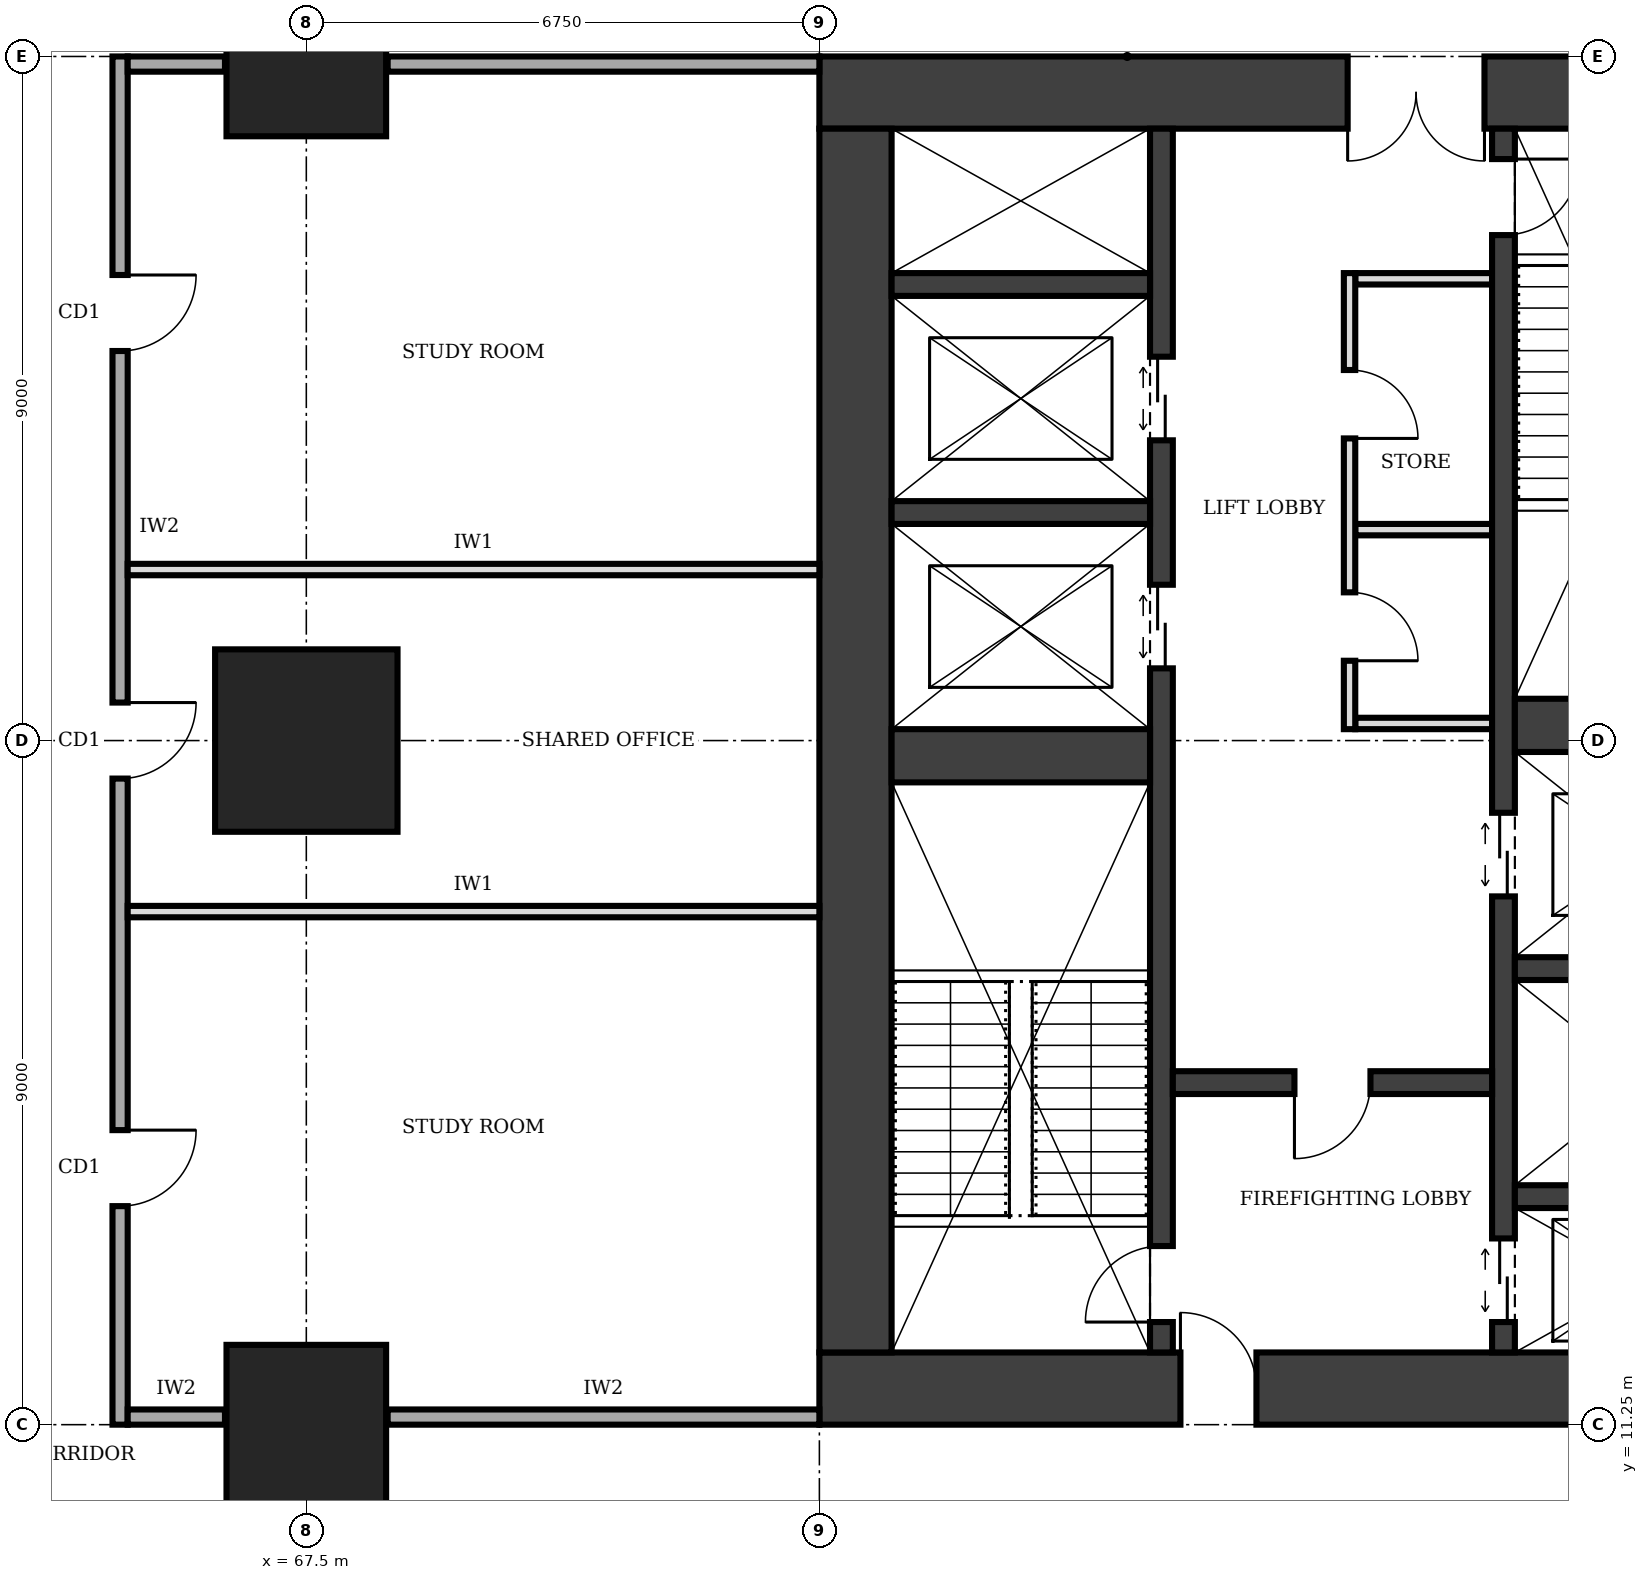
"""IFC4 building model, lengths in metres.
Left out: names, types, materials, properties, quantities, classifications, styles, units other than length and angle.
Written with IfcOpenShell. Run it as: python <this file> out.ifc"""

import sys

from ifc_helpers import new_model, si_unit, direction, frame, frame_2d, origin, origin_2d, place, context, subcontext, project, spatial, rectangle, extrude, element, fill, save


model = new_model("IFC4")
c1 = context("Model", 3, precision=1e-05, world=origin(), true_north=direction((0.0, 1.0)))
c2 = subcontext(c1, "Body", "Model", "MODEL_VIEW")
j1 = project(units=[si_unit("LENGTHUNIT", "METRE"), si_unit("PLANEANGLEUNIT", "RADIAN")], contexts=[c1])
p1 = place(None, origin())
s1 = spatial("IfcSite", under=j1, at=p1, CompositionType="ELEMENT")
p2 = place(p1, origin())
s2 = spatial("IfcBuilding", under=s1, at=p2, CompositionType="ELEMENT")
p3 = place(p2, frame((0.0, 0.0, 97.0)))
s3 = spatial("IfcBuildingStorey", under=s2, at=p3, CompositionType="ELEMENT", Elevation=97.0)
p4 = place(p3, frame((74.25, 11.725, 0.0), z_axis=(0.0, 0.0, 1.0), x_axis=(1.0, 0.0, 0.0)))
e1 = element("IfcWall", 1, at=p4, inside=s3, PredefinedType="SHEAR", context=c2, shape_type="SweptSolid", body=[
    extrude(rectangle(XDim=13.5, YDim=0.95, at=frame_2d((6.75, 0.0))), origin(), (0.0, 0.0, 1.0), 4.0),
])
p5 = place(p4, frame((4.75, 0.0, 0.0)))
e2 = element("IfcOpeningElement", 2, at=p5, cuts=e1, PredefinedType="OPENING", context=c2, shape_type="SweptSolid", body=[
    extrude(rectangle(XDim=1.0, YDim=2.1, at=frame_2d((0.5, 1.05))), frame((0.0, 0.485, 0.0), z_axis=(0.0, -1.0, 0.0), x_axis=(1.0, 0.0, 0.0)), (0.0, 0.0, 1.0), 0.97),
])
p6 = place(p3, frame((87.75, 28.775, 0.0), z_axis=(0.0, 0.0, 1.0), x_axis=(-1.0, 0.0, 0.0)))
e3 = element("IfcWall", 3, at=p6, inside=s3, PredefinedType="SHEAR", context=c2, shape_type="SweptSolid", body=[
    extrude(rectangle(XDim=13.5, YDim=0.95, at=frame_2d((6.75, 0.0))), origin(), (0.0, 0.0, 1.0), 4.0),
])
p7 = place(p6, frame((4.75, 0.0, 0.0)))
e4 = element("IfcOpeningElement", 4, at=p7, cuts=e3, PredefinedType="OPENING", context=c2, shape_type="SweptSolid", body=[
    extrude(rectangle(XDim=1.8, YDim=2.1, at=frame_2d((0.9, 1.05))), frame((0.0, 0.485, 0.0), z_axis=(0.0, -1.0, 0.0), x_axis=(1.0, 0.0, 0.0)), (0.0, 0.0, 1.0), 0.97),
])
p8 = place(p3, frame((74.725, 28.3, 0.0), z_axis=(0.0, 0.0, 1.0), x_axis=(0.0, -1.0, 0.0)))
e5 = element("IfcWall", 5, at=p8, inside=s3, PredefinedType="SHEAR", context=c2, shape_type="SweptSolid", body=[
    extrude(rectangle(XDim=16.1, YDim=0.95, at=frame_2d((8.05, 0.0))), origin(), (0.0, 0.0, 1.0), 4.0),
])
p9 = place(p3, frame((78.75, 12.2, 0.0), z_axis=(0.0, 0.0, 1.0), x_axis=(0.0, 1.0, 0.0)))
e6 = element("IfcWall", 6, at=p9, inside=s3, PredefinedType="SHEAR", context=c2, shape_type="SweptSolid", body=[
    extrude(rectangle(XDim=16.1, YDim=0.3, at=frame_2d((8.05, 0.0))), origin(), (0.0, 0.0, 1.0), 4.0),
])
p10 = place(p9, frame((0.4, 0.0, 0.0)))
e7 = element("IfcOpeningElement", 7, at=p10, cuts=e6, PredefinedType="OPENING", context=c2, shape_type="SweptSolid", body=[
    extrude(rectangle(XDim=1.0, YDim=2.1, at=frame_2d((0.5, 1.05))), frame((0.0, 0.16, 0.0), z_axis=(0.0, -1.0, 0.0), x_axis=(1.0, 0.0, 0.0)), (0.0, 0.0, 1.0), 0.32),
])
p11 = place(p9, frame((9.0, 0.0, 0.0)))
e8 = element("IfcOpeningElement", 8, at=p11, cuts=e6, PredefinedType="OPENING", context=c2, shape_type="SweptSolid", body=[
    extrude(rectangle(XDim=1.1, YDim=2.1, at=frame_2d((0.55, 1.05))), frame((0.0, 0.16, 0.0), z_axis=(0.0, -1.0, 0.0), x_axis=(1.0, 0.0, 0.0)), (0.0, 0.0, 1.0), 0.32),
])
p12 = place(p9, frame((12.0, 0.0, 0.0)))
e9 = element("IfcOpeningElement", 9, at=p12, cuts=e6, PredefinedType="OPENING", context=c2, shape_type="SweptSolid", body=[
    extrude(rectangle(XDim=1.1, YDim=2.1, at=frame_2d((0.55, 1.05))), frame((0.0, 0.16, 0.0), z_axis=(0.0, -1.0, 0.0), x_axis=(1.0, 0.0, 0.0)), (0.0, 0.0, 1.0), 0.32),
])
p13 = place(p3, frame((83.25, 12.2, 0.0), z_axis=(0.0, 0.0, 1.0), x_axis=(0.0, 1.0, 0.0)))
e10 = element("IfcWall", 10, at=p13, inside=s3, PredefinedType="SHEAR", context=c2, shape_type="SweptSolid", body=[
    extrude(rectangle(XDim=16.1, YDim=0.3, at=frame_2d((8.05, 0.0))), origin(), (0.0, 0.0, 1.0), 4.0),
])
p14 = place(p13, frame((14.7, 0.0, 0.0)))
e11 = element("IfcOpeningElement", 11, at=p14, cuts=e10, PredefinedType="OPENING", context=c2, shape_type="SweptSolid", body=[
    extrude(rectangle(XDim=1.0, YDim=2.1, at=frame_2d((0.5, 1.05))), frame((0.0, 0.16, 0.0), z_axis=(0.0, -1.0, 0.0), x_axis=(1.0, 0.0, 0.0)), (0.0, 0.0, 1.0), 0.32),
])
p15 = place(p13, frame((0.4, 0.0, 0.0)))
e12 = element("IfcOpeningElement", 12, at=p15, cuts=e10, PredefinedType="OPENING", context=c2, shape_type="SweptSolid", body=[
    extrude(rectangle(XDim=1.1, YDim=2.1, at=frame_2d((0.55, 1.05))), frame((0.0, 0.16, 0.0), z_axis=(0.0, -1.0, 0.0), x_axis=(1.0, 0.0, 0.0)), (0.0, 0.0, 1.0), 0.32),
])
p16 = place(p13, frame((6.0, 0.0, 0.0)))
e13 = element("IfcOpeningElement", 13, at=p16, cuts=e10, PredefinedType="OPENING", context=c2, shape_type="SweptSolid", body=[
    extrude(rectangle(XDim=1.1, YDim=2.1, at=frame_2d((0.55, 1.05))), frame((0.0, 0.16, 0.0), z_axis=(0.0, -1.0, 0.0), x_axis=(1.0, 0.0, 0.0)), (0.0, 0.0, 1.0), 0.32),
])
p17 = place(p3, frame((75.2, 20.05, 0.0), z_axis=(0.0, 0.0, 1.0), x_axis=(1.0, 0.0, 0.0)))
e14 = element("IfcWall", 14, at=p17, inside=s3, PredefinedType="SHEAR", context=c2, shape_type="SweptSolid", body=[
    extrude(rectangle(XDim=3.4, YDim=0.7, at=frame_2d((1.7, 0.0))), origin(), (0.0, 0.0, 1.0), 4.0),
])
p18 = place(p3, frame((78.9, 15.75, 0.0), z_axis=(0.0, 0.0, 1.0), x_axis=(1.0, 0.0, 0.0)))
e15 = element("IfcWall", 15, at=p18, inside=s3, PredefinedType="SHEAR", context=c2, shape_type="SweptSolid", body=[
    extrude(rectangle(XDim=4.2, YDim=0.3, at=frame_2d((2.1, 0.0))), origin(), (0.0, 0.0, 1.0), 4.0),
])
p19 = place(p18, frame((1.6, 0.0, 0.0)))
e16 = element("IfcOpeningElement", 16, at=p19, cuts=e15, PredefinedType="OPENING", context=c2, shape_type="SweptSolid", body=[
    extrude(rectangle(XDim=1.0, YDim=2.1, at=frame_2d((0.5, 1.05))), frame((0.0, 0.16, 0.0), z_axis=(0.0, -1.0, 0.0), x_axis=(1.0, 0.0, 0.0)), (0.0, 0.0, 1.0), 0.32),
])
for number, where, z_axis, x_axis in (
    (17, (83.4, 14.25, 0.0), (0.0, 0.0, 1.0), (1.0, 0.0, 0.0)),
    (18, (83.4, 17.25, 0.0), (0.0, 0.0, 1.0), (1.0, 0.0, 0.0)),
):
    element("IfcWall", number, at=place(p3, frame(where, z_axis=z_axis, x_axis=x_axis)), inside=s3, PredefinedType="SHEAR", context=c2, shape_type="SweptSolid", body=[
        extrude(rectangle(XDim=3.4, YDim=0.3, at=frame_2d((1.7, 0.0))), origin(), (0.0, 0.0, 1.0), 4.0),
    ])
p20 = place(p3, frame((83.4, 20.45, 0.0), z_axis=(0.0, 0.0, 1.0), x_axis=(1.0, 0.0, 0.0)))
e19 = element("IfcWall", 19, at=p20, inside=s3, PredefinedType="SHEAR", context=c2, shape_type="SweptSolid", body=[
    extrude(rectangle(XDim=3.4, YDim=0.7, at=frame_2d((1.7, 0.0))), origin(), (0.0, 0.0, 1.0), 4.0),
])
for number, where, z_axis, x_axis in (
    (20, (75.2, 23.25, 0.0), (0.0, 0.0, 1.0), (1.0, 0.0, 0.0)),
    (21, (75.2, 26.25, 0.0), (0.0, 0.0, 1.0), (1.0, 0.0, 0.0)),
):
    element("IfcWall", number, at=place(p3, frame(where, z_axis=z_axis, x_axis=x_axis)), inside=s3, PredefinedType="SHEAR", context=c2, shape_type="SweptSolid", body=[
        extrude(rectangle(XDim=3.4, YDim=0.3, at=frame_2d((1.7, 0.0))), origin(), (0.0, 0.0, 1.0), 4.0),
    ])
p21 = place(p3, frame((67.5, 11.25, 0.0), z_axis=(0.0, 0.0, 1.0), x_axis=(1.0, 0.0, 0.0)))
e22 = element("IfcColumn", 22, at=p21, inside=s3, PredefinedType="COLUMN", context=c2, shape_type="SweptSolid", body=[
    extrude(rectangle(XDim=2.1, YDim=2.1, at=origin_2d()), origin(), (0.0, 0.0, 1.0), 4.0),
])
p22 = place(p3, frame((67.5, 20.25, 0.0), z_axis=(0.0, 0.0, 1.0), x_axis=(1.0, 0.0, 0.0)))
e23 = element("IfcColumn", 23, at=p22, inside=s3, PredefinedType="COLUMN", context=c2, shape_type="SweptSolid", body=[
    extrude(rectangle(XDim=2.4, YDim=2.4, at=origin_2d()), origin(), (0.0, 0.0, 1.0), 4.0),
])
p23 = place(p3, frame((67.5, 29.25, 0.0), z_axis=(0.0, 0.0, 1.0), x_axis=(1.0, 0.0, 0.0)))
e24 = element("IfcColumn", 24, at=p23, inside=s3, PredefinedType="COLUMN", context=c2, shape_type="SweptSolid", body=[
    extrude(rectangle(XDim=2.1, YDim=2.1, at=origin_2d()), origin(), (0.0, 0.0, 1.0), 4.0),
])
p24 = place(p3, frame((81.225, 20.4, 0.0), z_axis=(0.0, 0.0, 1.0), x_axis=(0.0, 1.0, 0.0)))
e25 = element("IfcWall", 25, at=p24, inside=s3, PredefinedType="PARTITIONING", context=c2, shape_type="SweptSolid", body=[
    extrude(rectangle(XDim=6.0, YDim=0.15, at=frame_2d((3.0, 0.0))), origin(), (0.0, 0.0, 1.0), 3.75),
])
p25 = place(p24, frame((0.9, 0.0, 0.0)))
e26 = element("IfcOpeningElement", 26, at=p25, cuts=e25, PredefinedType="OPENING", context=c2, shape_type="SweptSolid", body=[
    extrude(rectangle(XDim=0.9, YDim=2.1, at=frame_2d((0.45, 1.05))), frame((0.0, 0.085, 0.0), z_axis=(0.0, -1.0, 0.0), x_axis=(1.0, 0.0, 0.0)), (0.0, 0.0, 1.0), 0.17),
])
p26 = place(p24, frame((3.825, 0.0, 0.0)))
e27 = element("IfcOpeningElement", 27, at=p26, cuts=e25, PredefinedType="OPENING", context=c2, shape_type="SweptSolid", body=[
    extrude(rectangle(XDim=0.9, YDim=2.1, at=frame_2d((0.45, 1.05))), frame((0.0, 0.085, 0.0), z_axis=(0.0, -1.0, 0.0), x_axis=(1.0, 0.0, 0.0)), (0.0, 0.0, 1.0), 0.17),
])
for number, where, z_axis, x_axis in (
    (28, (81.3, 20.475, 0.0), (0.0, 0.0, 1.0), (1.0, 0.0, 0.0)),
    (29, (81.3, 23.025, 0.0), (0.0, 0.0, 1.0), (1.0, 0.0, 0.0)),
    (30, (81.3, 26.325, 0.0), (0.0, 0.0, 1.0), (1.0, 0.0, 0.0)),
):
    element("IfcWall", number, at=place(p3, frame(where, z_axis=z_axis, x_axis=x_axis)), inside=s3, PredefinedType="PARTITIONING", context=c2, shape_type="SweptSolid", body=[
        extrude(rectangle(XDim=1.8, YDim=0.15, at=frame_2d((0.9, 0.0))), origin(), (0.0, 0.0, 1.0), 3.75),
    ])
p27 = place(p3, frame((65.05, 29.25, 0.0), z_axis=(0.0, 0.0, 1.0), x_axis=(0.0, -1.0, 0.0)))
e31 = element("IfcWall", 31, at=p27, inside=s3, PredefinedType="SOLIDWALL", context=c2, shape_type="SweptSolid", body=[
    extrude(rectangle(XDim=18.0, YDim=0.2, at=frame_2d((9.0, 0.0))), origin(), (0.0, 0.0, 1.0), 3.75),
])
p28 = place(p27, frame((14.125, 0.0, 0.0)))
e32 = element("IfcOpeningElement", 32, at=p28, cuts=e31, PredefinedType="OPENING", context=c2, shape_type="SweptSolid", body=[
    extrude(rectangle(XDim=1.0, YDim=2.1, at=frame_2d((0.5, 1.05))), frame((0.0, 0.11, 0.0), z_axis=(0.0, -1.0, 0.0), x_axis=(1.0, 0.0, 0.0)), (0.0, 0.0, 1.0), 0.22),
])
p29 = place(p27, frame((8.5, 0.0, 0.0)))
e33 = element("IfcOpeningElement", 33, at=p29, cuts=e31, PredefinedType="OPENING", context=c2, shape_type="SweptSolid", body=[
    extrude(rectangle(XDim=1.0, YDim=2.1, at=frame_2d((0.5, 1.05))), frame((0.0, 0.11, 0.0), z_axis=(0.0, -1.0, 0.0), x_axis=(1.0, 0.0, 0.0)), (0.0, 0.0, 1.0), 0.22),
])
p30 = place(p27, frame((2.875, 0.0, 0.0)))
e34 = element("IfcOpeningElement", 34, at=p30, cuts=e31, PredefinedType="OPENING", context=c2, shape_type="SweptSolid", body=[
    extrude(rectangle(XDim=1.0, YDim=2.1, at=frame_2d((0.5, 1.05))), frame((0.0, 0.11, 0.0), z_axis=(0.0, -1.0, 0.0), x_axis=(1.0, 0.0, 0.0)), (0.0, 0.0, 1.0), 0.22),
])
p31 = place(p3, frame((65.15, 11.35, 0.0), z_axis=(0.0, 0.0, 1.0), x_axis=(1.0, 0.0, 0.0)))
e35 = element("IfcWall", 35, at=p31, inside=s3, PredefinedType="SOLIDWALL", context=c2, shape_type="SweptSolid", body=[
    extrude(rectangle(XDim=1.28, YDim=0.2, at=frame_2d((0.64, 0.0))), origin(), (0.0, 0.0, 1.0), 2.85),
])
p32 = place(p3, frame((68.57, 11.35, 0.0), z_axis=(0.0, 0.0, 1.0), x_axis=(1.0, 0.0, 0.0)))
e36 = element("IfcWall", 36, at=p32, inside=s3, PredefinedType="SOLIDWALL", context=c2, shape_type="SweptSolid", body=[
    extrude(rectangle(XDim=5.68, YDim=0.2, at=frame_2d((2.84, 0.0))), origin(), (0.0, 0.0, 1.0), 2.85),
])
p33 = place(p3, frame((65.15, 29.15, 0.0), z_axis=(0.0, 0.0, 1.0), x_axis=(1.0, 0.0, 0.0)))
e37 = element("IfcWall", 37, at=p33, inside=s3, PredefinedType="SOLIDWALL", context=c2, shape_type="SweptSolid", body=[
    extrude(rectangle(XDim=1.28, YDim=0.2, at=frame_2d((0.64, 0.0))), origin(), (0.0, 0.0, 1.0), 2.85),
])
p34 = place(p3, frame((68.57, 29.15, 0.0), z_axis=(0.0, 0.0, 1.0), x_axis=(1.0, 0.0, 0.0)))
e38 = element("IfcWall", 38, at=p34, inside=s3, PredefinedType="SOLIDWALL", context=c2, shape_type="SweptSolid", body=[
    extrude(rectangle(XDim=5.68, YDim=0.2, at=frame_2d((2.84, 0.0))), origin(), (0.0, 0.0, 1.0), 2.85),
])
for number, where, z_axis, x_axis in (
    (39, (65.15, 18.0, 0.0), (0.0, 0.0, 1.0), (1.0, 0.0, 0.0)),
    (40, (65.15, 22.5, 0.0), (0.0, 0.0, 1.0), (1.0, 0.0, 0.0)),
):
    element("IfcWall", number, at=place(p3, frame(where, z_axis=z_axis, x_axis=x_axis)), inside=s3, PredefinedType="PARTITIONING", context=c2, shape_type="SweptSolid", body=[
        extrude(rectangle(XDim=9.1, YDim=0.15, at=frame_2d((4.55, 0.0))), origin(), (0.0, 0.0, 1.0), 3.75),
    ])
p35 = place(p5, origin())
e41 = element("IfcDoor", 41, at=p35, inside=s3, OperationType="SINGLE_SWING_LEFT", PredefinedType="DOOR", context=c2, shape_type="SweptSolid", body=[
    extrude(rectangle(XDim=1.0, YDim=2.1, at=frame_2d((0.5, 1.05))), frame((0.0, 0.025, 0.0), z_axis=(0.0, -1.0, 0.0), x_axis=(1.0, 0.0, 0.0)), (0.0, 0.0, 1.0), 0.05),
])
fill(e2, e41)
p36 = place(p7, origin())
e42 = element("IfcDoor", 42, at=p36, inside=s3, OperationType="DOUBLE_DOOR_SINGLE_SWING", PredefinedType="DOOR", context=c2, shape_type="SweptSolid", body=[
    extrude(rectangle(XDim=1.8, YDim=2.1, at=frame_2d((0.9, 1.05))), frame((0.0, 0.025, 0.0), z_axis=(0.0, -1.0, 0.0), x_axis=(1.0, 0.0, 0.0)), (0.0, 0.0, 1.0), 0.05),
])
fill(e4, e42)
p37 = place(p19, frame((1.0, 0.0, 0.0), z_axis=(0.0, 0.0, 1.0), x_axis=(-1.0, 0.0, 0.0)))
e43 = element("IfcDoor", 43, at=p37, inside=s3, OperationType="SINGLE_SWING_RIGHT", PredefinedType="DOOR", context=c2, shape_type="SweptSolid", body=[
    extrude(rectangle(XDim=1.0, YDim=2.1, at=frame_2d((0.5, 1.05))), frame((0.0, 0.025, 0.0), z_axis=(0.0, -1.0, 0.0), x_axis=(1.0, 0.0, 0.0)), (0.0, 0.0, 1.0), 0.05),
])
fill(e16, e43)
p38 = place(p10, origin())
e44 = element("IfcDoor", 44, at=p38, inside=s3, OperationType="SINGLE_SWING_LEFT", PredefinedType="DOOR", context=c2, shape_type="SweptSolid", body=[
    extrude(rectangle(XDim=1.0, YDim=2.1, at=frame_2d((0.5, 1.05))), frame((0.0, 0.025, 0.0), z_axis=(0.0, -1.0, 0.0), x_axis=(1.0, 0.0, 0.0)), (0.0, 0.0, 1.0), 0.05),
])
fill(e7, e44)
p39 = place(p14, frame((1.0, 0.0, 0.0), z_axis=(0.0, 0.0, 1.0), x_axis=(-1.0, 0.0, 0.0)))
e45 = element("IfcDoor", 45, at=p39, inside=s3, OperationType="SINGLE_SWING_LEFT", PredefinedType="DOOR", context=c2, shape_type="SweptSolid", body=[
    extrude(rectangle(XDim=1.0, YDim=2.1, at=frame_2d((0.5, 1.05))), frame((0.0, 0.025, 0.0), z_axis=(0.0, -1.0, 0.0), x_axis=(1.0, 0.0, 0.0)), (0.0, 0.0, 1.0), 0.05),
])
fill(e11, e45)
p40 = place(p15, origin())
e46 = element("IfcDoor", 46, at=p40, inside=s3, OperationType="DOUBLE_DOOR_SLIDING", PredefinedType="DOOR", context=c2, shape_type="SweptSolid", body=[
    extrude(rectangle(XDim=1.1, YDim=2.1, at=frame_2d((0.55, 1.05))), frame((0.0, 0.025, 0.0), z_axis=(0.0, -1.0, 0.0), x_axis=(1.0, 0.0, 0.0)), (0.0, 0.0, 1.0), 0.05),
])
fill(e12, e46)
p41 = place(p11, origin())
e47 = element("IfcDoor", 47, at=p41, inside=s3, OperationType="DOUBLE_DOOR_SLIDING", PredefinedType="DOOR", context=c2, shape_type="SweptSolid", body=[
    extrude(rectangle(XDim=1.1, YDim=2.1, at=frame_2d((0.55, 1.05))), frame((0.0, 0.025, 0.0), z_axis=(0.0, -1.0, 0.0), x_axis=(1.0, 0.0, 0.0)), (0.0, 0.0, 1.0), 0.05),
])
fill(e8, e47)
p42 = place(p12, origin())
e48 = element("IfcDoor", 48, at=p42, inside=s3, OperationType="DOUBLE_DOOR_SLIDING", PredefinedType="DOOR", context=c2, shape_type="SweptSolid", body=[
    extrude(rectangle(XDim=1.1, YDim=2.1, at=frame_2d((0.55, 1.05))), frame((0.0, 0.025, 0.0), z_axis=(0.0, -1.0, 0.0), x_axis=(1.0, 0.0, 0.0)), (0.0, 0.0, 1.0), 0.05),
])
fill(e9, e48)
p43 = place(p16, origin())
e49 = element("IfcDoor", 49, at=p43, inside=s3, OperationType="DOUBLE_DOOR_SLIDING", PredefinedType="DOOR", context=c2, shape_type="SweptSolid", body=[
    extrude(rectangle(XDim=1.1, YDim=2.1, at=frame_2d((0.55, 1.05))), frame((0.0, 0.025, 0.0), z_axis=(0.0, -1.0, 0.0), x_axis=(1.0, 0.0, 0.0)), (0.0, 0.0, 1.0), 0.05),
])
fill(e13, e49)
p44 = place(p25, frame((0.9, 0.0, 0.0), z_axis=(0.0, 0.0, 1.0), x_axis=(-1.0, 0.0, 0.0)))
e50 = element("IfcDoor", 50, at=p44, inside=s3, OperationType="SINGLE_SWING_RIGHT", PredefinedType="DOOR", context=c2, shape_type="SweptSolid", body=[
    extrude(rectangle(XDim=0.9, YDim=2.1, at=frame_2d((0.45, 1.05))), frame((0.0, 0.025, 0.0), z_axis=(0.0, -1.0, 0.0), x_axis=(1.0, 0.0, 0.0)), (0.0, 0.0, 1.0), 0.05),
])
fill(e26, e50)
p45 = place(p26, frame((0.9, 0.0, 0.0), z_axis=(0.0, 0.0, 1.0), x_axis=(-1.0, 0.0, 0.0)))
e51 = element("IfcDoor", 51, at=p45, inside=s3, OperationType="SINGLE_SWING_RIGHT", PredefinedType="DOOR", context=c2, shape_type="SweptSolid", body=[
    extrude(rectangle(XDim=0.9, YDim=2.1, at=frame_2d((0.45, 1.05))), frame((0.0, 0.025, 0.0), z_axis=(0.0, -1.0, 0.0), x_axis=(1.0, 0.0, 0.0)), (0.0, 0.0, 1.0), 0.05),
])
fill(e27, e51)
p46 = place(p28, origin())
e52 = element("IfcDoor", 52, at=p46, inside=s3, OperationType="SINGLE_SWING_LEFT", PredefinedType="DOOR", context=c2, shape_type="SweptSolid", body=[
    extrude(rectangle(XDim=1.0, YDim=2.1, at=frame_2d((0.5, 1.05))), frame((0.0, 0.025, 0.0), z_axis=(0.0, -1.0, 0.0), x_axis=(1.0, 0.0, 0.0)), (0.0, 0.0, 1.0), 0.05),
])
fill(e32, e52)
p47 = place(p29, origin())
e53 = element("IfcDoor", 53, at=p47, inside=s3, OperationType="SINGLE_SWING_LEFT", PredefinedType="DOOR", context=c2, shape_type="SweptSolid", body=[
    extrude(rectangle(XDim=1.0, YDim=2.1, at=frame_2d((0.5, 1.05))), frame((0.0, 0.025, 0.0), z_axis=(0.0, -1.0, 0.0), x_axis=(1.0, 0.0, 0.0)), (0.0, 0.0, 1.0), 0.05),
])
fill(e33, e53)
p48 = place(p30, origin())
e54 = element("IfcDoor", 54, at=p48, inside=s3, OperationType="SINGLE_SWING_LEFT", PredefinedType="DOOR", context=c2, shape_type="SweptSolid", body=[
    extrude(rectangle(XDim=1.0, YDim=2.1, at=frame_2d((0.5, 1.05))), frame((0.0, 0.025, 0.0), z_axis=(0.0, -1.0, 0.0), x_axis=(1.0, 0.0, 0.0)), (0.0, 0.0, 1.0), 0.05),
])
fill(e34, e54)
save(model, sys.argv[1])
